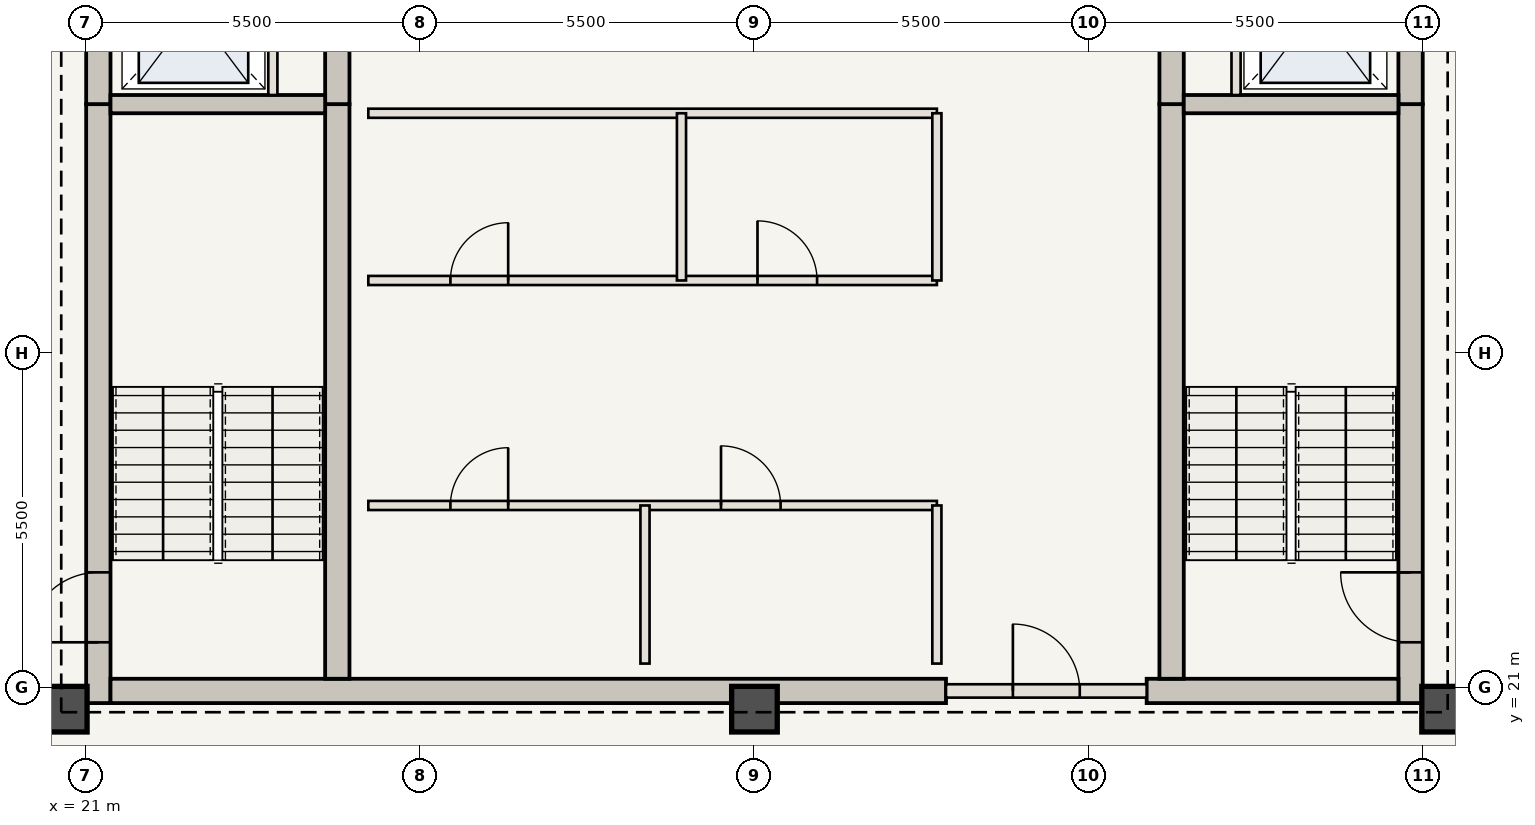
"""IFC4 building model, lengths in metres.
Left out: names, types, materials, properties, quantities, classifications, styles, units other than length and angle.
Written with IfcOpenShell. Run it as: python <this file> out.ifc"""

import sys

from ifc_helpers import new_model, si_unit, direction, frame, frame_2d, origin, origin_2d, place, context, subcontext, project, spatial, rectangle, extrude, element, fill, save


model = new_model("IFC4")
c1 = context("Model", 3, precision=1e-05, world=origin(), true_north=direction((0.0, 1.0)))
c2 = subcontext(c1, "Body", "Model", "MODEL_VIEW")
j1 = project(units=[si_unit("LENGTHUNIT", "METRE"), si_unit("PLANEANGLEUNIT", "RADIAN")], contexts=[c1])
p1 = place(None, origin())
s1 = spatial("IfcSite", under=j1, at=p1, CompositionType="ELEMENT")
p2 = place(p1, origin())
s2 = spatial("IfcBuilding", under=s1, at=p2, CompositionType="ELEMENT")
p3 = place(p2, frame((0.0, 0.0, 289.1)))
s3 = spatial("IfcBuildingStorey", under=s2, at=p3, CompositionType="ELEMENT", Elevation=289.1)
p4 = place(p3, frame((21.21, 20.75, 0.0), z_axis=(0.0, 0.0, 1.0), x_axis=(0.0, 1.0, 0.0)))
e1 = element("IfcWall", 1, at=p4, inside=s3, PredefinedType="SHEAR", context=c2, shape_type="SweptSolid", body=[
    extrude(rectangle(XDim=9.85, YDim=0.4, at=frame_2d((4.925, 0.0))), origin(), (0.0, 0.0, 1.0), 3.85),
])
p5 = place(p4, frame((1.0, 0.0, 0.0)))
e2 = element("IfcOpeningElement", 2, at=p5, cuts=e1, PredefinedType="OPENING", context=c2, shape_type="SweptSolid", body=[
    extrude(rectangle(XDim=1.15, YDim=2.15, at=frame_2d((0.575, 1.075))), frame((0.0, 0.21, 0.0), z_axis=(0.0, -1.0, 0.0), x_axis=(1.0, 0.0, 0.0)), (0.0, 0.0, 1.0), 0.42),
])
p6 = place(p3, frame((21.21, 30.6, 0.0), z_axis=(0.0, 0.0, 1.0), x_axis=(0.0, 1.0, 0.0)))
e3 = element("IfcWall", 3, at=p6, inside=s3, PredefinedType="SHEAR", context=c2, shape_type="SweptSolid", body=[
    extrude(rectangle(XDim=12.6, YDim=0.4, at=frame_2d((6.3, 0.0))), origin(), (0.0, 0.0, 1.0), 3.85),
])
p7 = place(p6, frame((4.2, 0.0, 0.0)))
e4 = element("IfcOpeningElement", 4, at=p7, cuts=e3, PredefinedType="OPENING", context=c2, shape_type="SweptSolid", body=[
    extrude(rectangle(XDim=1.1, YDim=2.15, at=frame_2d((0.55, 1.075))), frame((0.0, 0.21, 0.0), z_axis=(0.0, -1.0, 0.0), x_axis=(1.0, 0.0, 0.0)), (0.0, 0.0, 1.0), 0.42),
])
p8 = place(p6, frame((9.2, 0.0, 0.0)))
e5 = element("IfcOpeningElement", 5, at=p8, cuts=e3, PredefinedType="OPENING", context=c2, shape_type="SweptSolid", body=[
    extrude(rectangle(XDim=0.92, YDim=2.1, at=frame_2d((0.46, 1.05))), frame((0.0, 0.21, 0.0), z_axis=(0.0, -1.0, 0.0), x_axis=(1.0, 0.0, 0.0)), (0.0, 0.0, 1.0), 0.42),
])
p9 = place(p3, frame((42.79, 20.75, 0.0), z_axis=(0.0, 0.0, 1.0), x_axis=(0.0, 1.0, 0.0)))
e6 = element("IfcWall", 6, at=p9, inside=s3, PredefinedType="SHEAR", context=c2, shape_type="SweptSolid", body=[
    extrude(rectangle(XDim=9.85, YDim=0.4, at=frame_2d((4.925, 0.0))), origin(), (0.0, 0.0, 1.0), 3.85),
])
p10 = place(p9, frame((1.0, 0.0, 0.0)))
e7 = element("IfcOpeningElement", 7, at=p10, cuts=e6, PredefinedType="OPENING", context=c2, shape_type="SweptSolid", body=[
    extrude(rectangle(XDim=1.15, YDim=2.15, at=frame_2d((0.575, 1.075))), frame((0.0, 0.21, 0.0), z_axis=(0.0, -1.0, 0.0), x_axis=(1.0, 0.0, 0.0)), (0.0, 0.0, 1.0), 0.42),
])
p11 = place(p3, frame((42.79, 30.6, 0.0), z_axis=(0.0, 0.0, 1.0), x_axis=(0.0, 1.0, 0.0)))
e8 = element("IfcWall", 8, at=p11, inside=s3, PredefinedType="SHEAR", context=c2, shape_type="SweptSolid", body=[
    extrude(rectangle(XDim=12.6, YDim=0.4, at=frame_2d((6.3, 0.0))), origin(), (0.0, 0.0, 1.0), 3.85),
])
p12 = place(p11, frame((4.2, 0.0, 0.0)))
e9 = element("IfcOpeningElement", 9, at=p12, cuts=e8, PredefinedType="OPENING", context=c2, shape_type="SweptSolid", body=[
    extrude(rectangle(XDim=1.1, YDim=2.15, at=frame_2d((0.55, 1.075))), frame((0.0, 0.21, 0.0), z_axis=(0.0, -1.0, 0.0), x_axis=(1.0, 0.0, 0.0)), (0.0, 0.0, 1.0), 0.42),
])
p13 = place(p11, frame((8.4, 0.0, 0.0)))
e10 = element("IfcOpeningElement", 10, at=p13, cuts=e8, PredefinedType="OPENING", context=c2, shape_type="SweptSolid", body=[
    extrude(rectangle(XDim=0.88, YDim=2.1, at=frame_2d((0.44, 1.05))), frame((0.0, 0.21, 0.0), z_axis=(0.0, -1.0, 0.0), x_axis=(1.0, 0.0, 0.0)), (0.0, 0.0, 1.0), 0.42),
])
p14 = place(p11, frame((10.5, 0.0, 0.0)))
e11 = element("IfcOpeningElement", 11, at=p14, cuts=e8, PredefinedType="OPENING", context=c2, shape_type="SweptSolid", body=[
    extrude(rectangle(XDim=0.88, YDim=2.1, at=frame_2d((0.44, 1.05))), frame((0.0, 0.21, 0.0), z_axis=(0.0, -1.0, 0.0), x_axis=(1.0, 0.0, 0.0)), (0.0, 0.0, 1.0), 0.42),
])
p15 = place(p3, frame((21.41, 20.95, 0.0), z_axis=(0.0, 0.0, 1.0), x_axis=(1.0, 0.0, 0.0)))
e12 = element("IfcWall", 12, at=p15, inside=s3, PredefinedType="SHEAR", context=c2, shape_type="SweptSolid", body=[
    extrude(rectangle(XDim=13.74, YDim=0.4, at=frame_2d((6.87, 0.0))), origin(), (0.0, 0.0, 1.0), 3.85),
])
p16 = place(p3, frame((38.45, 20.95, 0.0), z_axis=(0.0, 0.0, 1.0), x_axis=(1.0, 0.0, 0.0)))
e13 = element("IfcWall", 13, at=p16, inside=s3, PredefinedType="SHEAR", context=c2, shape_type="SweptSolid", body=[
    extrude(rectangle(XDim=4.14, YDim=0.4, at=frame_2d((2.07, 0.0))), origin(), (0.0, 0.0, 1.0), 3.85),
])
p17 = place(p3, frame((25.14, 21.15, 0.0), z_axis=(0.0, 0.0, 1.0), x_axis=(0.0, 1.0, 0.0)))
e14 = element("IfcWall", 14, at=p17, inside=s3, PredefinedType="SHEAR", context=c2, shape_type="SweptSolid", body=[
    extrude(rectangle(XDim=9.45, YDim=0.4, at=frame_2d((4.725, 0.0))), origin(), (0.0, 0.0, 1.0), 3.85),
])
p18 = place(p3, frame((25.14, 30.6, 0.0), z_axis=(0.0, 0.0, 1.0), x_axis=(0.0, 1.0, 0.0)))
e15 = element("IfcWall", 15, at=p18, inside=s3, PredefinedType="SHEAR", context=c2, shape_type="SweptSolid", body=[
    extrude(rectangle(XDim=12.2, YDim=0.4, at=frame_2d((6.1, 0.0))), origin(), (0.0, 0.0, 1.0), 3.85),
])
p19 = place(p18, frame((6.25, 0.0, 0.0)))
e16 = element("IfcOpeningElement", 16, at=p19, cuts=e15, PredefinedType="OPENING", context=c2, shape_type="SweptSolid", body=[
    extrude(rectangle(XDim=1.1, YDim=2.15, at=frame_2d((0.55, 1.075))), frame((0.0, 0.21, 0.0), z_axis=(0.0, -1.0, 0.0), x_axis=(1.0, 0.0, 0.0)), (0.0, 0.0, 1.0), 0.42),
])
p20 = place(p3, frame((38.86, 21.15, 0.0), z_axis=(0.0, 0.0, 1.0), x_axis=(0.0, 1.0, 0.0)))
e17 = element("IfcWall", 17, at=p20, inside=s3, PredefinedType="SHEAR", context=c2, shape_type="SweptSolid", body=[
    extrude(rectangle(XDim=9.45, YDim=0.4, at=frame_2d((4.725, 0.0))), origin(), (0.0, 0.0, 1.0), 3.85),
])
p21 = place(p3, frame((38.86, 30.6, 0.0), z_axis=(0.0, 0.0, 1.0), x_axis=(0.0, 1.0, 0.0)))
e18 = element("IfcWall", 18, at=p21, inside=s3, PredefinedType="SHEAR", context=c2, shape_type="SweptSolid", body=[
    extrude(rectangle(XDim=12.2, YDim=0.4, at=frame_2d((6.1, 0.0))), origin(), (0.0, 0.0, 1.0), 3.85),
])
for number, where, z_axis, x_axis in (
    (19, (20.65, 20.65, 0.0), (0.0, 0.0, 1.0), (1.0, 0.0, 0.0)),
    (20, (32.0, 20.65, 0.0), (0.0, 0.0, 1.0), (1.0, 0.0, 0.0)),
    (21, (43.35, 20.65, 0.0), (0.0, 0.0, 1.0), (1.0, 0.0, 0.0)),
):
    element("IfcColumn", number, at=place(p3, frame(where, z_axis=z_axis, x_axis=x_axis)), inside=s3, PredefinedType="COLUMN", context=c2, shape_type="SweptSolid", body=[
        extrude(rectangle(XDim=0.75, YDim=0.75, at=origin_2d()), origin(), (0.0, 0.0, 1.0), 3.85),
    ])
for number, where, z_axis, x_axis in (
    (22, (21.41, 30.6, 0.0), (0.0, 0.0, 1.0), (1.0, 0.0, 0.0)),
    (23, (39.06, 30.6, 0.0), (0.0, 0.0, 1.0), (1.0, 0.0, 0.0)),
):
    element("IfcWall", number, at=place(p3, frame(where, z_axis=z_axis, x_axis=x_axis)), inside=s3, PredefinedType="SHEAR", context=c2, shape_type="SweptSolid", body=[
        extrude(rectangle(XDim=3.53, YDim=0.3, at=frame_2d((1.765, 0.0))), origin(), (0.0, 0.0, 1.0), 3.685),
    ])
for number, where, z_axis, x_axis in (
    (24, (24.08, 30.75, 0.0), (0.0, 0.0, 1.0), (0.0, 1.0, 0.0)),
    (25, (39.92, 30.75, 0.0), (0.0, 0.0, 1.0), (0.0, 1.0, 0.0)),
):
    element("IfcWall", number, at=place(p3, frame(where, z_axis=z_axis, x_axis=x_axis)), inside=s3, PredefinedType="STANDARD", context=c2, shape_type="SweptSolid", body=[
        extrude(rectangle(XDim=2.65, YDim=0.15, at=frame_2d((1.325, 0.0))), origin(), (0.0, 0.0, 1.0), 3.685),
    ])
p22 = place(p3, frame((35.15, 20.95, 0.0), z_axis=(0.0, 0.0, 1.0), x_axis=(1.0, 0.0, 0.0)))
e26 = element("IfcWall", 26, at=p22, inside=s3, PredefinedType="STANDARD", context=c2, shape_type="SweptSolid", body=[
    extrude(rectangle(XDim=3.3, YDim=0.22, at=frame_2d((1.65, 0.0))), origin(), (0.0, 0.0, 1.0), 3.685),
])
p23 = place(p22, frame((1.1, 0.0, 0.0)))
e27 = element("IfcOpeningElement", 27, at=p23, cuts=e26, PredefinedType="OPENING", context=c2, shape_type="SweptSolid", body=[
    extrude(rectangle(XDim=1.1, YDim=2.15, at=frame_2d((0.55, 1.075))), frame((0.0, 0.12, 0.0), z_axis=(0.0, -1.0, 0.0), x_axis=(1.0, 0.0, 0.0)), (0.0, 0.0, 1.0), 0.24),
])
p24 = place(p3, frame((25.65, 24.0, 0.0), z_axis=(0.0, 0.0, 1.0), x_axis=(1.0, 0.0, 0.0)))
e28 = element("IfcWall", 28, at=p24, inside=s3, PredefinedType="STANDARD", context=c2, shape_type="SweptSolid", body=[
    extrude(rectangle(XDim=9.35, YDim=0.15, at=frame_2d((4.675, 0.0))), origin(), (0.0, 0.0, 1.0), 3.685),
])
p25 = place(p24, frame((1.35, 0.0, 0.0)))
e29 = element("IfcOpeningElement", 29, at=p25, cuts=e28, PredefinedType="OPENING", context=c2, shape_type="SweptSolid", body=[
    extrude(rectangle(XDim=0.95, YDim=2.15, at=frame_2d((0.475, 1.075))), frame((0.0, 0.085, 0.0), z_axis=(0.0, -1.0, 0.0), x_axis=(1.0, 0.0, 0.0)), (0.0, 0.0, 1.0), 0.17),
])
p26 = place(p24, frame((5.8, 0.0, 0.0)))
e30 = element("IfcOpeningElement", 30, at=p26, cuts=e28, PredefinedType="OPENING", context=c2, shape_type="SweptSolid", body=[
    extrude(rectangle(XDim=0.98, YDim=2.2, at=frame_2d((0.49, 1.1))), frame((0.0, 0.085, 0.0), z_axis=(0.0, -1.0, 0.0), x_axis=(1.0, 0.0, 0.0)), (0.0, 0.0, 1.0), 0.17),
])
for number, where, z_axis, x_axis in (
    (31, (30.2, 21.4, 0.0), (0.0, 0.0, 1.0), (0.0, 1.0, 0.0)),
    (32, (35.0, 21.4, 0.0), (0.0, 0.0, 1.0), (0.0, 1.0, 0.0)),
):
    element("IfcWall", number, at=place(p3, frame(where, z_axis=z_axis, x_axis=x_axis)), inside=s3, PredefinedType="STANDARD", context=c2, shape_type="SweptSolid", body=[
        extrude(rectangle(XDim=2.6, YDim=0.15, at=frame_2d((1.3, 0.0))), origin(), (0.0, 0.0, 1.0), 3.685),
    ])
p27 = place(p3, frame((25.65, 27.7, 0.0), z_axis=(0.0, 0.0, 1.0), x_axis=(1.0, 0.0, 0.0)))
e33 = element("IfcWall", 33, at=p27, inside=s3, PredefinedType="STANDARD", context=c2, shape_type="SweptSolid", body=[
    extrude(rectangle(XDim=9.35, YDim=0.15, at=frame_2d((4.675, 0.0))), origin(), (0.0, 0.0, 1.0), 3.685),
])
p28 = place(p27, frame((1.35, 0.0, 0.0)))
e34 = element("IfcOpeningElement", 34, at=p28, cuts=e33, PredefinedType="OPENING", context=c2, shape_type="SweptSolid", body=[
    extrude(rectangle(XDim=0.95, YDim=2.15, at=frame_2d((0.475, 1.075))), frame((0.0, 0.085, 0.0), z_axis=(0.0, -1.0, 0.0), x_axis=(1.0, 0.0, 0.0)), (0.0, 0.0, 1.0), 0.17),
])
p29 = place(p27, frame((6.4, 0.0, 0.0)))
e35 = element("IfcOpeningElement", 35, at=p29, cuts=e33, PredefinedType="OPENING", context=c2, shape_type="SweptSolid", body=[
    extrude(rectangle(XDim=0.98, YDim=2.2, at=frame_2d((0.49, 1.1))), frame((0.0, 0.085, 0.0), z_axis=(0.0, -1.0, 0.0), x_axis=(1.0, 0.0, 0.0)), (0.0, 0.0, 1.0), 0.17),
])
p30 = place(p3, frame((25.65, 30.45, 0.0), z_axis=(0.0, 0.0, 1.0), x_axis=(1.0, 0.0, 0.0)))
e36 = element("IfcWall", 36, at=p30, inside=s3, PredefinedType="STANDARD", context=c2, shape_type="SweptSolid", body=[
    extrude(rectangle(XDim=9.35, YDim=0.15, at=frame_2d((4.675, 0.0))), origin(), (0.0, 0.0, 1.0), 3.685),
])
for number, where, z_axis, x_axis in (
    (37, (30.8, 27.7, 0.0), (0.0, 0.0, 1.0), (0.0, 1.0, 0.0)),
    (38, (35.0, 27.7, 0.0), (0.0, 0.0, 1.0), (0.0, 1.0, 0.0)),
):
    element("IfcWall", number, at=place(p3, frame(where, z_axis=z_axis, x_axis=x_axis)), inside=s3, PredefinedType="STANDARD", context=c2, shape_type="SweptSolid", body=[
        extrude(rectangle(XDim=2.75, YDim=0.15, at=frame_2d((1.375, 0.0))), origin(), (0.0, 0.0, 1.0), 3.685),
    ])
p31 = place(p5, origin())
e39 = element("IfcDoor", 39, at=p31, inside=s3, OperationType="SINGLE_SWING_LEFT", PredefinedType="DOOR", context=c2, shape_type="SweptSolid", body=[
    extrude(rectangle(XDim=1.15, YDim=2.15, at=frame_2d((0.575, 1.075))), frame((0.0, 0.025, 0.0), z_axis=(0.0, -1.0, 0.0), x_axis=(1.0, 0.0, 0.0)), (0.0, 0.0, 1.0), 0.05),
])
fill(e2, e39)
p32 = place(p10, origin())
e40 = element("IfcDoor", 40, at=p32, inside=s3, OperationType="SINGLE_SWING_RIGHT", PredefinedType="DOOR", context=c2, shape_type="SweptSolid", body=[
    extrude(rectangle(XDim=1.15, YDim=2.15, at=frame_2d((0.575, 1.075))), frame((0.0, 0.025, 0.0), z_axis=(0.0, -1.0, 0.0), x_axis=(1.0, 0.0, 0.0)), (0.0, 0.0, 1.0), 0.05),
])
fill(e7, e40)
p33 = place(p23, origin())
e41 = element("IfcDoor", 41, at=p33, inside=s3, OperationType="SINGLE_SWING_LEFT", PredefinedType="DOOR", context=c2, shape_type="SweptSolid", body=[
    extrude(rectangle(XDim=1.1, YDim=2.15, at=frame_2d((0.55, 1.075))), frame((0.0, 0.025, 0.0), z_axis=(0.0, -1.0, 0.0), x_axis=(1.0, 0.0, 0.0)), (0.0, 0.0, 1.0), 0.05),
])
fill(e27, e41)
p34 = place(p25, origin())
e42 = element("IfcDoor", 42, at=p34, inside=s3, OperationType="SINGLE_SWING_RIGHT", PredefinedType="DOOR", context=c2, shape_type="SweptSolid", body=[
    extrude(rectangle(XDim=0.95, YDim=2.15, at=frame_2d((0.475, 1.075))), frame((0.0, 0.025, 0.0), z_axis=(0.0, -1.0, 0.0), x_axis=(1.0, 0.0, 0.0)), (0.0, 0.0, 1.0), 0.05),
])
fill(e29, e42)
p35 = place(p26, origin())
e43 = element("IfcDoor", 43, at=p35, inside=s3, OperationType="SINGLE_SWING_LEFT", PredefinedType="DOOR", context=c2, shape_type="SweptSolid", body=[
    extrude(rectangle(XDim=0.98, YDim=2.2, at=frame_2d((0.49, 1.1))), frame((0.0, 0.025, 0.0), z_axis=(0.0, -1.0, 0.0), x_axis=(1.0, 0.0, 0.0)), (0.0, 0.0, 1.0), 0.05),
])
fill(e30, e43)
p36 = place(p28, origin())
e44 = element("IfcDoor", 44, at=p36, inside=s3, OperationType="SINGLE_SWING_RIGHT", PredefinedType="DOOR", context=c2, shape_type="SweptSolid", body=[
    extrude(rectangle(XDim=0.95, YDim=2.15, at=frame_2d((0.475, 1.075))), frame((0.0, 0.025, 0.0), z_axis=(0.0, -1.0, 0.0), x_axis=(1.0, 0.0, 0.0)), (0.0, 0.0, 1.0), 0.05),
])
fill(e34, e44)
p37 = place(p29, origin())
e45 = element("IfcDoor", 45, at=p37, inside=s3, OperationType="SINGLE_SWING_LEFT", PredefinedType="DOOR", context=c2, shape_type="SweptSolid", body=[
    extrude(rectangle(XDim=0.98, YDim=2.2, at=frame_2d((0.49, 1.1))), frame((0.0, 0.025, 0.0), z_axis=(0.0, -1.0, 0.0), x_axis=(1.0, 0.0, 0.0)), (0.0, 0.0, 1.0), 0.05),
])
fill(e35, e45)
save(model, sys.argv[1])
